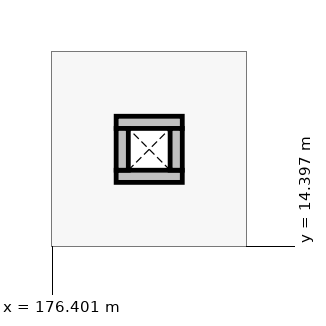
"""IFC4 building model, lengths in metres.
Left out: names, types, materials, properties, quantities, classifications, styles, units other than length and angle.
Written with IfcOpenShell. Run it as: python <this file> out.ifc"""

import sys

from ifc_helpers import new_model, si_unit, direction, frame, frame_2d, origin, place, context, subcontext, project, spatial, rectangle, extrude, element, save


model = new_model("IFC4")
c1 = context("Model", 3, precision=1e-05, world=origin(), true_north=direction((0.0, 1.0)))
c2 = subcontext(c1, "Body", "Model", "MODEL_VIEW")
j1 = project(units=[si_unit("LENGTHUNIT", "METRE"), si_unit("PLANEANGLEUNIT", "RADIAN")], contexts=[c1])
p1 = place(None, origin())
s1 = spatial("IfcSite", under=j1, at=p1, CompositionType="ELEMENT")
p2 = place(p1, origin())
s2 = spatial("IfcBuilding", under=s1, at=p2, CompositionType="ELEMENT")
p3 = place(p2, frame((0.0, 0.0, 8.4)))
s3 = spatial("IfcBuildingStorey", under=s2, at=p3, CompositionType="ELEMENT", Elevation=8.4)
for number, where, z_axis, x_axis in (
    (1, (177.24, 15.32, 0.0), (0.0, 0.0, 1.0), (1.0, 0.0, 0.0)),
    (2, (177.24, 16.03, 0.0), (0.0, 0.0, 1.0), (1.0, 0.0, 0.0)),
):
    element("IfcWall", number, at=place(p3, frame(where, z_axis=z_axis, x_axis=x_axis)), inside=s3, PredefinedType="PARTITIONING", context=c2, shape_type="SweptSolid", body=[
        extrude(rectangle(XDim=0.87, YDim=0.16, at=frame_2d((0.435, 0.0))), origin(), (0.0, 0.0, 1.0), 3.35),
    ])
for number, where, z_axis, x_axis in (
    (3, (177.32, 15.4, 0.0), (0.0, 0.0, 1.0), (0.0, 1.0, 0.0)),
    (4, (178.03, 15.4, 0.0), (0.0, 0.0, 1.0), (0.0, 1.0, 0.0)),
):
    element("IfcWall", number, at=place(p3, frame(where, z_axis=z_axis, x_axis=x_axis)), inside=s3, PredefinedType="PARTITIONING", context=c2, shape_type="SweptSolid", body=[
        extrude(rectangle(XDim=0.55, YDim=0.16, at=frame_2d((0.275, 0.0))), origin(), (0.0, 0.0, 1.0), 3.35),
    ])
save(model, sys.argv[1])
